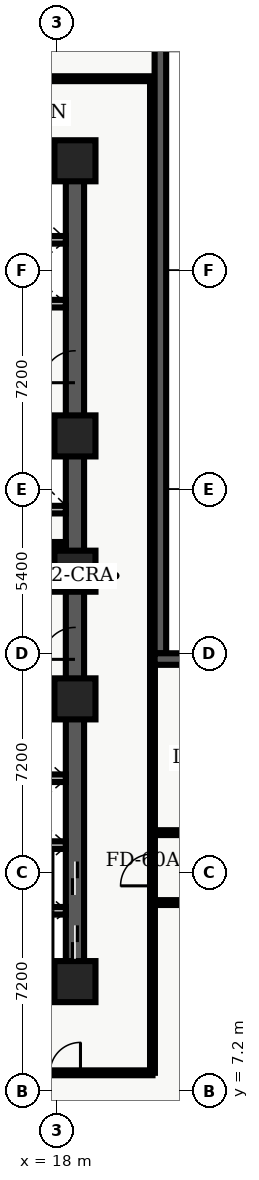
"""IFC4 building model, lengths in metres.
Left out: names, types, materials, properties, quantities, classifications, styles, units other than length and angle.
Written with IfcOpenShell. Run it as: python <this file> out.ifc"""

import sys

from ifc_helpers import new_model, entity, si_unit, converted_unit, direction, frame, origin_with_axes, origin_2d_with_axis, place, context, subcontext, project, spatial, polyline, rectangle, outline, extrude, element, fill, save


model = new_model("IFC4")
c1 = context("Model", 3, precision=1e-05, world=origin_with_axes(), true_north=direction((0.0, 1.0)))
c2 = subcontext(c1, "Body", "Model", "MODEL_VIEW")
j1 = project(units=[si_unit("LENGTHUNIT", "METRE"), converted_unit("PLANEANGLEUNIT", "DEGREE", entity("IfcPlaneAngleMeasure", 0.017), si_unit("PLANEANGLEUNIT", "RADIAN"), dimensions=[0, 0, 0, 0, 0, 0, 0])], contexts=[c1])
p1 = place(None, origin_with_axes())
s1 = spatial("IfcSite", under=j1, at=p1, CompositionType="ELEMENT")
p2 = place(p1, origin_with_axes())
s2 = spatial("IfcBuilding", under=s1, at=p2, CompositionType="ELEMENT")
p3 = place(p2, frame((0.0, 0.0, 52.2), z_axis=(0.0, 0.0, 1.0), x_axis=(1.0, 0.0, 0.0)))
s3 = spatial("IfcBuildingStorey", under=s2, at=p3, CompositionType="ELEMENT", Elevation=52.2)
p4 = place(p3, frame((11.4, 10.8, 0.0), z_axis=(0.0, 0.0, 1.0), x_axis=(1.0, 0.0, 0.0)))
e1 = element("IfcWall", 1, at=p4, inside=s3, PredefinedType="SHEAR", context=c2, shape_type="SweptSolid", body=[
    extrude(outline(polyline([(0.0, -0.3), (7.2, -0.3), (7.2, 0.3), (0.0, 0.3), (0.0, -0.3)])), origin_with_axes(), (0.0, 0.0, 1.0), 3.66),
])
p5 = place(p4, frame((2.625, 0.0, 0.0), z_axis=(0.0, 0.0, 1.0), x_axis=(1.0, 0.0, 0.0)))
e2 = element("IfcOpeningElement", 2, at=p5, cuts=e1, PredefinedType="OPENING", context=c2, shape_type="SweptSolid", body=[
    extrude(rectangle(XDim=1.05, YDim=0.62, at=origin_2d_with_axis()), origin_with_axes(), (0.0, 0.0, 1.0), 2.15),
])
p6 = place(p3, frame((11.4, 37.8, 0.0), z_axis=(0.0, 0.0, 1.0), x_axis=(1.0, 0.0, 0.0)))
e3 = element("IfcWall", 3, at=p6, inside=s3, PredefinedType="SHEAR", context=c2, shape_type="SweptSolid", body=[
    extrude(outline(polyline([(0.0, -0.3), (7.2, -0.3), (7.2, 0.3), (0.0, 0.3), (0.0, -0.3)])), origin_with_axes(), (0.0, 0.0, 1.0), 3.66),
])
p7 = place(p6, frame((2.625, 0.0, 0.0), z_axis=(0.0, 0.0, 1.0), x_axis=(1.0, 0.0, 0.0)))
e4 = element("IfcOpeningElement", 4, at=p7, cuts=e3, PredefinedType="OPENING", context=c2, shape_type="SweptSolid", body=[
    extrude(rectangle(XDim=1.05, YDim=0.62, at=origin_2d_with_axis()), origin_with_axes(), (0.0, 0.0, 1.0), 2.15),
])
p8 = place(p3, frame((18.6, 10.8, 0.0), z_axis=(0.0, 0.0, 1.0), x_axis=(0.0, 1.0, 0.0)))
e5 = element("IfcWall", 5, at=p8, inside=s3, PredefinedType="SHEAR", context=c2, shape_type="SweptSolid", body=[
    extrude(outline(polyline([(0.0, -0.3), (13.5, -0.3), (13.5, 0.3), (0.0, 0.3), (0.0, -0.3)])), origin_with_axes(), (0.0, 0.0, 1.0), 3.66),
])
p9 = place(p8, frame((1.3, 0.0, 0.0), z_axis=(0.0, 0.0, 1.0), x_axis=(1.0, 0.0, 0.0)))
e6 = element("IfcOpeningElement", 6, at=p9, cuts=e5, PredefinedType="OPENING", context=c2, shape_type="SweptSolid", body=[
    extrude(rectangle(XDim=1.1, YDim=0.62, at=origin_2d_with_axis()), origin_with_axes(), (0.0, 0.0, 1.0), 2.15),
])
p10 = place(p8, frame((3.4, 0.0, 0.0), z_axis=(0.0, 0.0, 1.0), x_axis=(1.0, 0.0, 0.0)))
e7 = element("IfcOpeningElement", 7, at=p10, cuts=e5, PredefinedType="OPENING", context=c2, shape_type="SweptSolid", body=[
    extrude(rectangle(XDim=1.1, YDim=0.62, at=origin_2d_with_axis()), origin_with_axes(), (0.0, 0.0, 1.0), 2.15),
])
p11 = place(p8, frame((11.125, 0.0, 0.0), z_axis=(0.0, 0.0, 1.0), x_axis=(1.0, 0.0, 0.0)))
e8 = element("IfcOpeningElement", 8, at=p11, cuts=e5, PredefinedType="OPENING", context=c2, shape_type="SweptSolid", body=[
    extrude(rectangle(XDim=1.05, YDim=0.62, at=origin_2d_with_axis()), origin_with_axes(), (0.0, 0.0, 1.0), 2.15),
])
p12 = place(p3, frame((18.6, 24.3, 0.0), z_axis=(0.0, 0.0, 1.0), x_axis=(0.0, 1.0, 0.0)))
e9 = element("IfcWall", 9, at=p12, inside=s3, PredefinedType="SHEAR", context=c2, shape_type="SweptSolid", body=[
    extrude(outline(polyline([(0.0, -0.3), (13.5, -0.3), (13.5, 0.3), (0.0, 0.3), (0.0, -0.3)])), origin_with_axes(), (0.0, 0.0, 1.0), 3.66),
])
p13 = place(p12, frame((6.725, 0.0, 0.0), z_axis=(0.0, 0.0, 1.0), x_axis=(1.0, 0.0, 0.0)))
e10 = element("IfcOpeningElement", 10, at=p13, cuts=e9, PredefinedType="OPENING", context=c2, shape_type="SweptSolid", body=[
    extrude(rectangle(XDim=1.05, YDim=0.62, at=origin_2d_with_axis()), origin_with_axes(), (0.0, 0.0, 1.0), 2.15),
])
for number, where, z_axis, x_axis in (
    (11, (11.7, 19.825, 0.0), (0.0, 0.0, 1.0), (1.0, 0.0, 0.0)),
    (12, (11.7, 28.775, 0.0), (0.0, 0.0, 1.0), (1.0, 0.0, 0.0)),
):
    element("IfcWall", number, at=place(p3, frame(where, z_axis=z_axis, x_axis=x_axis)), inside=s3, PredefinedType="SHEAR", context=c2, shape_type="SweptSolid", body=[
        extrude(outline(polyline([(0.0, -0.125), (6.6, -0.125), (6.6, 0.125), (0.0, 0.125), (0.0, -0.125)])), origin_with_axes(), (0.0, 0.0, 1.0), 3.66),
    ])
p14 = place(p3, frame((11.7, 24.1, 0.0), z_axis=(0.0, 0.0, 1.0), x_axis=(1.0, 0.0, 0.0)))
e13 = element("IfcWall", 13, at=p14, inside=s3, PredefinedType="SOLIDWALL", context=c2, shape_type="SweptSolid", body=[
    extrude(outline(polyline([(0.0, -0.125), (6.6, -0.125), (6.6, 0.125), (0.0, 0.125), (0.0, -0.125)])), origin_with_axes(), (0.0, 0.0, 1.0), 2.7),
])
p15 = place(p14, frame((3.75, 0.0, 0.0), z_axis=(0.0, 0.0, 1.0), x_axis=(1.0, 0.0, 0.0)))
e14 = element("IfcOpeningElement", 14, at=p15, cuts=e13, PredefinedType="OPENING", context=c2, shape_type="SweptSolid", body=[
    extrude(rectangle(XDim=0.9, YDim=0.27, at=origin_2d_with_axis()), origin_with_axes(), (0.0, 0.0, 1.0), 2.15),
])
p16 = place(p3, frame((11.7, 26.325, 0.0), z_axis=(0.0, 0.0, 1.0), x_axis=(1.0, 0.0, 0.0)))
e15 = element("IfcWall", 15, at=p16, inside=s3, PredefinedType="SOLIDWALL", context=c2, shape_type="SweptSolid", body=[
    extrude(outline(polyline([(0.0, -0.125), (6.6, -0.125), (6.6, 0.125), (0.0, 0.125), (0.0, -0.125)])), origin_with_axes(), (0.0, 0.0, 1.0), 2.7),
])
p17 = place(p16, frame((3.5, 0.0, 0.0), z_axis=(0.0, 0.0, 1.0), x_axis=(1.0, 0.0, 0.0)))
e16 = element("IfcOpeningElement", 16, at=p17, cuts=e15, PredefinedType="OPENING", context=c2, shape_type="SweptSolid", body=[
    extrude(rectangle(XDim=0.9, YDim=0.27, at=origin_2d_with_axis()), origin_with_axes(), (0.0, 0.0, 1.0), 2.15),
])
for number, where, z_axis, x_axis in (
    (17, (18.6, 10.8, 0.0), (0.0, 0.0, 1.0), (1.0, 0.0, 0.0)),
    (18, (18.6, 20.1, 0.0), (0.0, 0.0, 1.0), (1.0, 0.0, 0.0)),
    (19, (18.6, 24.3, 0.0), (0.0, 0.0, 1.0), (1.0, 0.0, 0.0)),
    (20, (18.6, 28.75, 0.0), (0.0, 0.0, 1.0), (1.0, 0.0, 0.0)),
    (21, (18.6, 37.8, 0.0), (0.0, 0.0, 1.0), (1.0, 0.0, 0.0)),
):
    element("IfcColumn", number, at=place(p3, frame(where, z_axis=z_axis, x_axis=x_axis)), inside=s3, PredefinedType="COLUMN", context=c2, shape_type="SweptSolid", body=[
        extrude(rectangle(XDim=1.35, YDim=1.35, at=origin_2d_with_axis()), origin_with_axes(), (0.0, 0.0, 1.0), 3.9),
    ])
p18 = place(p3, frame((14.62, 25.18, 0.0), z_axis=(0.0, 0.0, 1.0), x_axis=(1.0, 0.0, 0.0)))
e22 = element("IfcWall", 22, at=p18, inside=s3, PredefinedType="PARTITIONING", context=c2, shape_type="SweptSolid", body=[
    extrude(outline(polyline([(0.0, -0.08), (3.68, -0.08), (3.68, 0.08), (0.0, 0.08), (0.0, -0.08)])), origin_with_axes(), (0.0, 0.0, 1.0), 2.7),
])
p19 = place(p18, frame((1.95, 0.0, 0.0), z_axis=(0.0, 0.0, 1.0), x_axis=(1.0, 0.0, 0.0)))
e23 = element("IfcOpeningElement", 23, at=p19, cuts=e22, PredefinedType="OPENING", context=c2, shape_type="SweptSolid", body=[
    extrude(rectangle(XDim=0.9, YDim=0.18, at=origin_2d_with_axis()), origin_with_axes(), (0.0, 0.0, 1.0), 2.15),
])
for number, where, z_axis, x_axis in (
    (24, (15.84, 13.13, 0.0), (0.0, 0.0, 1.0), (1.0, 0.0, 0.0)),
    (25, (15.84, 15.29, 0.0), (0.0, 0.0, 1.0), (1.0, 0.0, 0.0)),
    (26, (15.84, 17.49, 0.0), (0.0, 0.0, 1.0), (1.0, 0.0, 0.0)),
    (27, (15.84, 33.1, 0.0), (0.0, 0.0, 1.0), (1.0, 0.0, 0.0)),
    (28, (15.84, 35.2, 0.0), (0.0, 0.0, 1.0), (1.0, 0.0, 0.0)),
):
    element("IfcWall", number, at=place(p3, frame(where, z_axis=z_axis, x_axis=x_axis)), inside=s3, PredefinedType="SOLIDWALL", context=c2, shape_type="SweptSolid", body=[
        extrude(outline(polyline([(0.0, -0.125), (2.46, -0.125), (2.46, 0.125), (0.0, 0.125), (0.0, -0.125)])), origin_with_axes(), (0.0, 0.0, 1.0), 2.7),
    ])
p20 = place(p3, frame((2.6, 7.8, 0.0), z_axis=(0.0, 0.0, 1.0), x_axis=(1.0, 0.0, 0.0)))
e29 = element("IfcWall", 29, at=p20, inside=s3, PredefinedType="PARTITIONING", context=c2, shape_type="SweptSolid", body=[
    extrude(outline(polyline([(0.0, -0.08), (18.55, -0.08), (18.55, 0.08), (0.0, 0.08), (0.0, -0.08)])), origin_with_axes(), (0.0, 0.0, 1.0), 2.7),
])
p21 = place(p20, frame((6.426, 0.0, 0.0), z_axis=(0.0, 0.0, 1.0), x_axis=(1.0, 0.0, 0.0)))
e30 = element("IfcOpeningElement", 30, at=p21, cuts=e29, PredefinedType="OPENING", context=c2, shape_type="SweptSolid", body=[
    extrude(rectangle(XDim=1.2, YDim=0.18, at=origin_2d_with_axis()), origin_with_axes(), (0.0, 0.0, 1.0), 2.2),
])
p22 = place(p20, frame((15.681, 0.0, 0.0), z_axis=(0.0, 0.0, 1.0), x_axis=(1.0, 0.0, 0.0)))
e31 = element("IfcOpeningElement", 31, at=p22, cuts=e29, PredefinedType="OPENING", context=c2, shape_type="SweptSolid", body=[
    extrude(rectangle(XDim=1.0, YDim=0.18, at=origin_2d_with_axis()), origin_with_axes(), (0.0, 0.0, 1.0), 2.15),
])
p23 = place(p3, frame((2.6, 40.5, 0.0), z_axis=(0.0, 0.0, 1.0), x_axis=(1.0, 0.0, 0.0)))
e32 = element("IfcWall", 32, at=p23, inside=s3, PredefinedType="PARTITIONING", context=c2, shape_type="SweptSolid", body=[
    extrude(outline(polyline([(0.0, -0.08), (18.65, -0.08), (18.65, 0.08), (0.0, 0.08), (0.0, -0.08)])), origin_with_axes(), (0.0, 0.0, 1.0), 2.7),
])
p24 = place(p23, frame((2.268, 0.0, 0.0), z_axis=(0.0, 0.0, 1.0), x_axis=(1.0, 0.0, 0.0)))
e33 = element("IfcOpeningElement", 33, at=p24, cuts=e32, PredefinedType="OPENING", context=c2, shape_type="SweptSolid", body=[
    extrude(rectangle(XDim=1.0, YDim=0.18, at=origin_2d_with_axis()), origin_with_axes(), (0.0, 0.0, 1.0), 2.15),
])
p25 = place(p23, frame((7.261, 0.0, 0.0), z_axis=(0.0, 0.0, 1.0), x_axis=(1.0, 0.0, 0.0)))
e34 = element("IfcOpeningElement", 34, at=p25, cuts=e32, PredefinedType="OPENING", context=c2, shape_type="SweptSolid", body=[
    extrude(rectangle(XDim=1.0, YDim=0.18, at=origin_2d_with_axis()), origin_with_axes(), (0.0, 0.0, 1.0), 2.15),
])
p26 = place(p23, frame((13.197, 0.0, 0.0), z_axis=(0.0, 0.0, 1.0), x_axis=(1.0, 0.0, 0.0)))
e35 = element("IfcOpeningElement", 35, at=p26, cuts=e32, PredefinedType="OPENING", context=c2, shape_type="SweptSolid", body=[
    extrude(rectangle(XDim=1.0, YDim=0.18, at=origin_2d_with_axis()), origin_with_axes(), (0.0, 0.0, 1.0), 2.15),
])
p27 = place(p3, frame((21.15, 7.8, 0.0), z_axis=(0.0, 0.0, 1.0), x_axis=(0.0, 1.0, 0.0)))
e36 = element("IfcWall", 36, at=p27, inside=s3, PredefinedType="PARTITIONING", context=c2, shape_type="SweptSolid", body=[
    extrude(outline(polyline([(0.0, -0.08), (32.7, -0.08), (32.7, 0.08), (0.0, 0.08), (0.0, -0.08)])), origin_with_axes(), (0.0, 0.0, 1.0), 2.7),
])
p28 = place(p27, frame((6.675, 0.0, 0.0), z_axis=(0.0, 0.0, 1.0), x_axis=(1.0, 0.0, 0.0)))
e37 = element("IfcOpeningElement", 37, at=p28, cuts=e36, PredefinedType="OPENING", context=c2, shape_type="SweptSolid", body=[
    extrude(rectangle(XDim=1.05, YDim=0.18, at=origin_2d_with_axis()), origin_with_axes(), (0.0, 0.0, 1.0), 2.15),
])
p29 = place(p3, frame((21.15, 13.4, 0.0), z_axis=(0.0, 0.0, 1.0), x_axis=(1.0, 0.0, 0.0)))
e38 = element("IfcWall", 38, at=p29, inside=s3, PredefinedType="PARTITIONING", context=c2, shape_type="SweptSolid", body=[
    extrude(outline(polyline([(0.0, -0.08), (15.2, -0.08), (15.2, 0.08), (0.0, 0.08), (0.0, -0.08)])), origin_with_axes(), (0.0, 0.0, 1.0), 2.7),
])
p30 = place(p29, frame((2.829, 0.0, 0.0), z_axis=(0.0, 0.0, 1.0), x_axis=(1.0, 0.0, 0.0)))
e39 = element("IfcOpeningElement", 39, at=p30, cuts=e38, PredefinedType="OPENING", context=c2, shape_type="SweptSolid", body=[
    extrude(rectangle(XDim=1.0, YDim=0.18, at=origin_2d_with_axis()), origin_with_axes(), (0.0, 0.0, 1.0), 2.15),
])
p31 = place(p29, frame((8.536, 0.0, 0.0), z_axis=(0.0, 0.0, 1.0), x_axis=(1.0, 0.0, 0.0)))
e40 = element("IfcOpeningElement", 40, at=p31, cuts=e38, PredefinedType="OPENING", context=c2, shape_type="SweptSolid", body=[
    extrude(rectangle(XDim=1.2, YDim=0.18, at=origin_2d_with_axis()), origin_with_axes(), (0.0, 0.0, 1.0), 2.2),
])
p32 = place(p29, frame((13.076, 0.0, 0.0), z_axis=(0.0, 0.0, 1.0), x_axis=(1.0, 0.0, 0.0)))
e41 = element("IfcOpeningElement", 41, at=p32, cuts=e38, PredefinedType="OPENING", context=c2, shape_type="SweptSolid", body=[
    extrude(rectangle(XDim=1.0, YDim=0.18, at=origin_2d_with_axis()), origin_with_axes(), (0.0, 0.0, 1.0), 2.15),
])
p33 = place(p3, frame((21.15, 15.7, 0.0), z_axis=(0.0, 0.0, 1.0), x_axis=(1.0, 0.0, 0.0)))
e42 = element("IfcWall", 42, at=p33, inside=s3, PredefinedType="PARTITIONING", context=c2, shape_type="SweptSolid", body=[
    extrude(outline(polyline([(0.0, -0.08), (15.2, -0.08), (15.2, 0.08), (0.0, 0.08), (0.0, -0.08)])), origin_with_axes(), (0.0, 0.0, 1.0), 2.7),
])
p34 = place(p33, frame((3.468, 0.0, 0.0), z_axis=(0.0, 0.0, 1.0), x_axis=(1.0, 0.0, 0.0)))
e43 = element("IfcOpeningElement", 43, at=p34, cuts=e42, PredefinedType="OPENING", context=c2, shape_type="SweptSolid", body=[
    extrude(rectangle(XDim=1.0, YDim=0.18, at=origin_2d_with_axis()), origin_with_axes(), (0.0, 0.0, 1.0), 2.15),
])
p35 = place(p33, frame((10.938, 0.0, 0.0), z_axis=(0.0, 0.0, 1.0), x_axis=(1.0, 0.0, 0.0)))
e44 = element("IfcOpeningElement", 44, at=p35, cuts=e42, PredefinedType="OPENING", context=c2, shape_type="SweptSolid", body=[
    extrude(rectangle(XDim=1.0, YDim=0.18, at=origin_2d_with_axis()), origin_with_axes(), (0.0, 0.0, 1.0), 2.15),
])
p36 = place(p3, frame((21.41, 45.82, 0.0), z_axis=(0.0, 0.0, 1.0), x_axis=(0.0, -1.0, 0.0)))
e45 = element("IfcWall", 45, at=p36, inside=s3, PredefinedType="SOLIDWALL", context=c2, shape_type="SweptSolid", body=[
    extrude(outline(polyline([(0.0, -0.19), (24.22, -0.19), (24.22, 0.19), (0.0, 0.19), (0.0, -0.19)])), origin_with_axes(), (0.0, 0.0, 1.0), 3.66),
])
p37 = place(p36, frame((2.902, 0.0, 0.45), z_axis=(0.0, 0.0, 1.0), x_axis=(1.0, 0.0, 0.0)))
e46 = element("IfcOpeningElement", 46, at=p37, cuts=e45, PredefinedType="OPENING", context=c2, shape_type="SweptSolid", body=[
    extrude(rectangle(XDim=2.1, YDim=0.4, at=origin_2d_with_axis()), origin_with_axes(), (0.0, 0.0, 1.0), 2.2),
])
p38 = place(p3, frame((21.22, 21.41, 0.0), z_axis=(0.0, 0.0, 1.0), x_axis=(1.0, 0.0, 0.0)))
e47 = element("IfcWall", 47, at=p38, inside=s3, PredefinedType="SOLIDWALL", context=c2, shape_type="SweptSolid", body=[
    extrude(outline(polyline([(0.0, -0.19), (17.18, -0.19), (17.18, 0.19), (0.0, 0.19), (0.0, -0.19)])), origin_with_axes(), (0.0, 0.0, 1.0), 3.66),
])
p39 = place(p38, frame((3.263, 0.0, 0.45), z_axis=(0.0, 0.0, 1.0), x_axis=(1.0, 0.0, 0.0)))
e48 = element("IfcOpeningElement", 48, at=p39, cuts=e47, PredefinedType="OPENING", context=c2, shape_type="SweptSolid", body=[
    extrude(rectangle(XDim=2.1, YDim=0.4, at=origin_2d_with_axis()), origin_with_axes(), (0.0, 0.0, 1.0), 2.2),
])
p40 = place(p38, frame((8.59, 0.0, 0.45), z_axis=(0.0, 0.0, 1.0), x_axis=(1.0, 0.0, 0.0)))
e49 = element("IfcOpeningElement", 49, at=p40, cuts=e47, PredefinedType="OPENING", context=c2, shape_type="SweptSolid", body=[
    extrude(rectangle(XDim=2.1, YDim=0.4, at=origin_2d_with_axis()), origin_with_axes(), (0.0, 0.0, 1.0), 2.2),
])
p41 = place(p38, frame((13.467, 0.0, 0.45), z_axis=(0.0, 0.0, 1.0), x_axis=(1.0, 0.0, 0.0)))
e50 = element("IfcOpeningElement", 50, at=p41, cuts=e47, PredefinedType="OPENING", context=c2, shape_type="SweptSolid", body=[
    extrude(rectangle(XDim=2.1, YDim=0.4, at=origin_2d_with_axis()), origin_with_axes(), (0.0, 0.0, 1.0), 2.2),
])
p42 = place(p8, frame((1.3, 0.0, 0.0), z_axis=(0.0, 0.0, 1.0), x_axis=(1.0, 0.0, 0.0)))
e51 = element("IfcDoor", 51, at=p42, inside=s3, OperationType="SLIDING_TO_LEFT", PredefinedType="DOOR", context=c2, shape_type="SweptSolid", body=[
    extrude(rectangle(XDim=1.1, YDim=0.09, at=origin_2d_with_axis()), origin_with_axes(), (0.0, 0.0, 1.0), 2.15),
])
fill(e6, e51)
p43 = place(p8, frame((3.4, 0.0, 0.0), z_axis=(0.0, 0.0, 1.0), x_axis=(1.0, 0.0, 0.0)))
e52 = element("IfcDoor", 52, at=p43, inside=s3, OperationType="SLIDING_TO_RIGHT", PredefinedType="DOOR", context=c2, shape_type="SweptSolid", body=[
    extrude(rectangle(XDim=1.1, YDim=0.09, at=origin_2d_with_axis()), origin_with_axes(), (0.0, 0.0, 1.0), 2.15),
])
fill(e7, e52)
p44 = place(p8, frame((11.125, 0.0, 0.0), z_axis=(0.0, 0.0, 1.0), x_axis=(1.0, 0.0, 0.0)))
e53 = element("IfcDoor", 53, at=p44, inside=s3, OperationType="SINGLE_SWING_LEFT", PredefinedType="DOOR", context=c2, shape_type="SweptSolid", body=[
    extrude(rectangle(XDim=1.05, YDim=0.09, at=origin_2d_with_axis()), origin_with_axes(), (0.0, 0.0, 1.0), 2.15),
])
fill(e8, e53)
p45 = place(p12, frame((6.725, 0.0, 0.0), z_axis=(0.0, 0.0, 1.0), x_axis=(1.0, 0.0, 0.0)))
e54 = element("IfcDoor", 54, at=p45, inside=s3, OperationType="SINGLE_SWING_LEFT", PredefinedType="DOOR", context=c2, shape_type="SweptSolid", body=[
    extrude(rectangle(XDim=1.05, YDim=0.09, at=origin_2d_with_axis()), origin_with_axes(), (0.0, 0.0, 1.0), 2.15),
])
fill(e10, e54)
p46 = place(p20, frame((15.681, 0.0, 0.0), z_axis=(0.0, 0.0, 1.0), x_axis=(1.0, 0.0, 0.0)))
e55 = element("IfcDoor", 55, at=p46, inside=s3, OperationType="SINGLE_SWING_RIGHT", PredefinedType="DOOR", context=c2, shape_type="SweptSolid", body=[
    extrude(rectangle(XDim=1.0, YDim=0.09, at=origin_2d_with_axis()), origin_with_axes(), (0.0, 0.0, 1.0), 2.15),
])
fill(e31, e55)
p47 = place(p27, frame((6.675, 0.0, 0.0), z_axis=(0.0, 0.0, 1.0), x_axis=(1.0, 0.0, 0.0)))
e56 = element("IfcDoor", 56, at=p47, inside=s3, OperationType="SINGLE_SWING_LEFT", PredefinedType="DOOR", context=c2, shape_type="SweptSolid", body=[
    extrude(rectangle(XDim=1.05, YDim=0.09, at=origin_2d_with_axis()), origin_with_axes(), (0.0, 0.0, 1.0), 2.15),
])
fill(e37, e56)
save(model, sys.argv[1])
